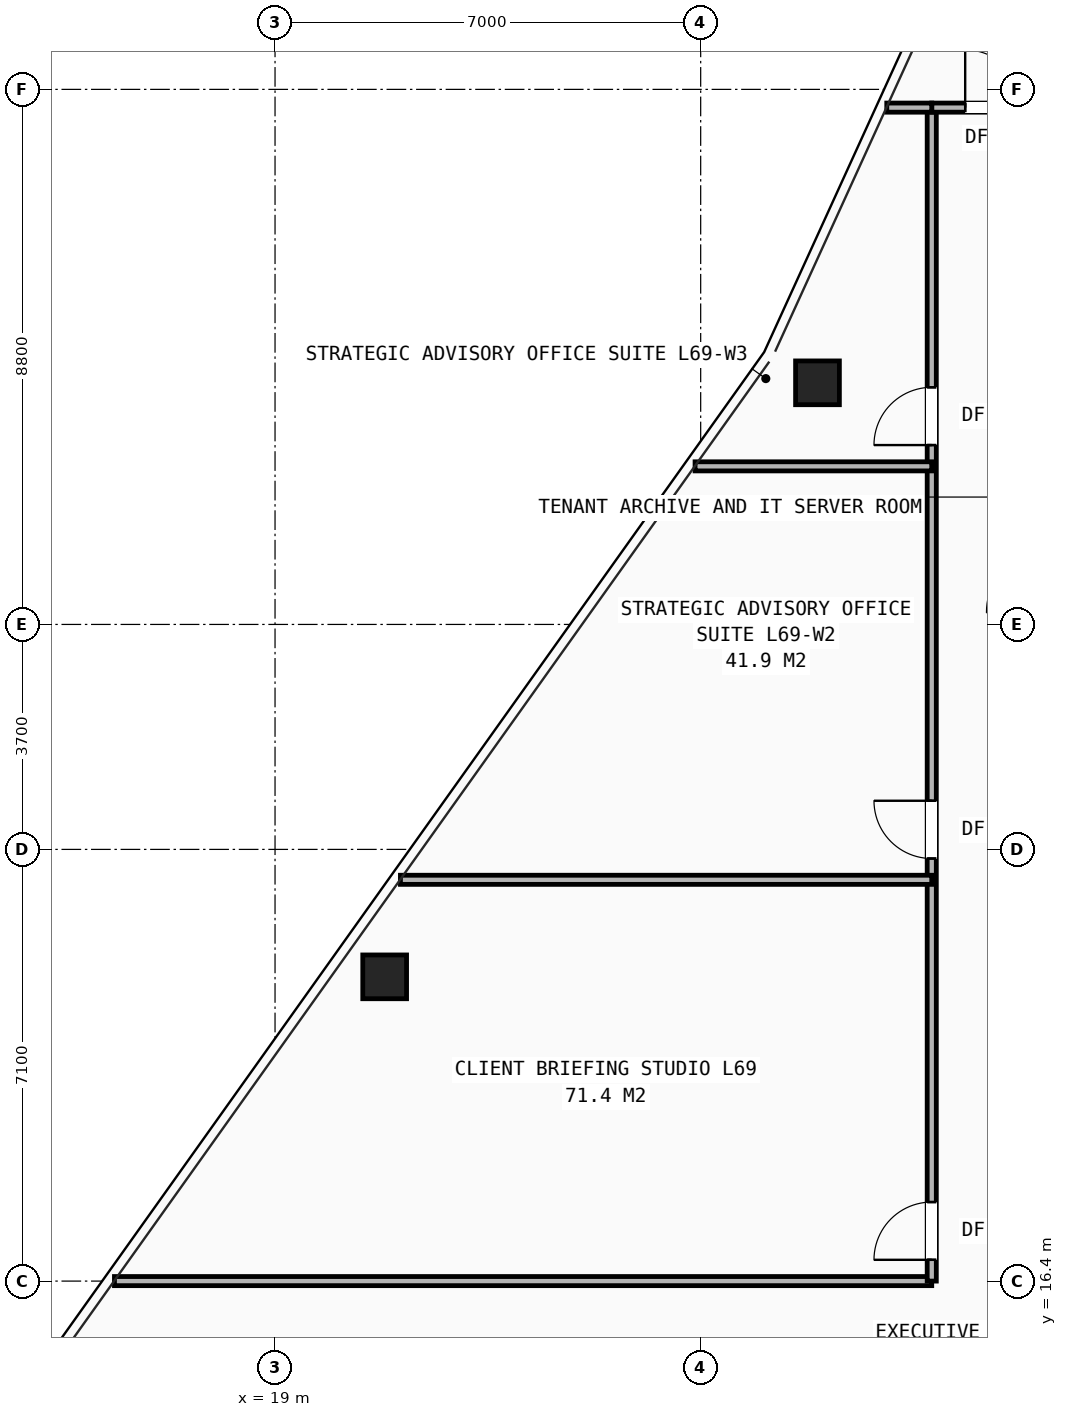
"""IFC4 building model, lengths in metres.
Left out: names, types, materials, properties, quantities, classifications, styles, units other than length and angle.
Written with IfcOpenShell. Run it as: python <this file> out.ifc"""

import sys

from ifc_helpers import new_model, si_unit, direction, frame, frame_2d, origin, origin_2d, place, context, subcontext, project, spatial, rectangle, hollow_rectangle, extrude, element, fill, save


model = new_model("IFC4")
c1 = context("Model", 3, precision=1e-05, world=origin(), true_north=direction((0.0, 1.0)))
c2 = subcontext(c1, "Body", "Model", "MODEL_VIEW")
j1 = project(units=[si_unit("LENGTHUNIT", "METRE"), si_unit("PLANEANGLEUNIT", "RADIAN")], contexts=[c1])
p1 = place(None, origin())
s1 = spatial("IfcSite", under=j1, at=p1, CompositionType="ELEMENT")
p2 = place(p1, origin())
s2 = spatial("IfcBuilding", under=s1, at=p2, CompositionType="ELEMENT")
p3 = place(p2, frame((0.0, 0.0, 243.4)))
s3 = spatial("IfcBuildingStorey", under=s2, at=p3, CompositionType="ELEMENT", Elevation=243.4)
for number, where, z_axis, x_axis in (
    (1, (27.921, 31.174, 0.0), (0.0, 0.0, 1.0), (1.0, 0.0, 0.0)),
    (2, (20.803, 21.404, 0.0), (0.0, 0.0, 1.0), (1.0, 0.0, 0.0)),
):
    element("IfcColumn", number, at=place(p3, frame(where, z_axis=z_axis, x_axis=x_axis)), inside=s3, PredefinedType="COLUMN", context=c2, shape_type="SweptSolid", body=[
        extrude(hollow_rectangle(XDim=0.72, YDim=0.72, WallThickness=0.05, at=origin_2d()), origin(), (0.0, 0.0, 1.0), 3.5),
    ])
p4 = place(p3, frame((16.359, 16.4, 0.0), z_axis=(0.0, 0.0, 1.0), x_axis=(1.0, 0.0, 0.0)))
e3 = element("IfcWall", 3, at=p4, inside=s3, PredefinedType="PARTITIONING", context=c2, shape_type="SweptSolid", body=[
    extrude(rectangle(XDim=13.441, YDim=0.15, at=frame_2d((6.72, 0.0))), origin(), (0.0, 0.0, 1.0), 2.292),
])
p5 = place(p3, frame((29.8, 16.4, 0.0), z_axis=(0.0, 0.0, 1.0), x_axis=(0.0, 1.0, 0.0)))
e4 = element("IfcWall", 4, at=p5, inside=s3, PredefinedType="PARTITIONING", context=c2, shape_type="SweptSolid", body=[
    extrude(rectangle(XDim=19.3, YDim=0.15, at=frame_2d((9.65, 0.0))), origin(), (0.0, 0.0, 1.0), 2.292),
])
p6 = place(p5, frame((0.35, 0.0, 0.0)))
e5 = element("IfcOpeningElement", 5, at=p6, cuts=e4, PredefinedType="OPENING", context=c2, shape_type="SweptSolid", body=[
    extrude(rectangle(XDim=0.95, YDim=2.1, at=frame_2d((0.475, 1.05))), frame((0.0, 0.085, 0.0), z_axis=(0.0, -1.0, 0.0), x_axis=(1.0, 0.0, 0.0)), (0.0, 0.0, 1.0), 0.17),
])
p7 = place(p5, frame((6.95, 0.0, 0.0)))
e6 = element("IfcOpeningElement", 6, at=p7, cuts=e4, PredefinedType="OPENING", context=c2, shape_type="SweptSolid", body=[
    extrude(rectangle(XDim=0.95, YDim=2.1, at=frame_2d((0.475, 1.05))), frame((0.0, 0.085, 0.0), z_axis=(0.0, -1.0, 0.0), x_axis=(1.0, 0.0, 0.0)), (0.0, 0.0, 1.0), 0.17),
])
p8 = place(p5, frame((13.75, 0.0, 0.0)))
e7 = element("IfcOpeningElement", 7, at=p8, cuts=e4, PredefinedType="OPENING", context=c2, shape_type="SweptSolid", body=[
    extrude(rectangle(XDim=0.95, YDim=2.1, at=frame_2d((0.475, 1.05))), frame((0.0, 0.085, 0.0), z_axis=(0.0, -1.0, 0.0), x_axis=(1.0, 0.0, 0.0)), (0.0, 0.0, 1.0), 0.17),
])
p9 = place(p3, frame((29.8, 35.7, 0.0), z_axis=(0.0, 0.0, 1.0), x_axis=(1.0, 0.0, 0.0)))
e8 = element("IfcWall", 8, at=p9, inside=s3, PredefinedType="PARTITIONING", context=c2, shape_type="SweptSolid", body=[
    extrude(rectangle(XDim=9.45, YDim=0.15, at=frame_2d((4.725, 0.0))), origin(), (0.0, 0.0, 1.0), 2.628),
])
p10 = place(p9, frame((0.55, 0.0, 0.0)))
e9 = element("IfcOpeningElement", 9, at=p10, cuts=e8, PredefinedType="OPENING", context=c2, shape_type="SweptSolid", body=[
    extrude(rectangle(XDim=0.95, YDim=2.1, at=frame_2d((0.475, 1.05))), frame((0.0, 0.085, 0.0), z_axis=(0.0, -1.0, 0.0), x_axis=(1.0, 0.0, 0.0)), (0.0, 0.0, 1.0), 0.17),
])
p11 = place(p9, frame((6.35, 0.0, 0.0)))
e10 = element("IfcOpeningElement", 10, at=p11, cuts=e8, PredefinedType="OPENING", context=c2, shape_type="SweptSolid", body=[
    extrude(rectangle(XDim=0.95, YDim=2.1, at=frame_2d((0.475, 1.05))), frame((0.0, 0.085, 0.0), z_axis=(0.0, -1.0, 0.0), x_axis=(1.0, 0.0, 0.0)), (0.0, 0.0, 1.0), 0.17),
])
p12 = place(p3, frame((29.06, 35.7, 0.0), z_axis=(0.0, 0.0, 1.0), x_axis=(1.0, 0.0, 0.0)))
e11 = element("IfcWall", 11, at=p12, inside=s3, PredefinedType="PARTITIONING", context=c2, shape_type="SweptSolid", body=[
    extrude(rectangle(XDim=0.74, YDim=0.15, at=frame_2d((0.37, 0.0))), origin(), (0.0, 0.0, 1.0), 2.628),
])
p13 = place(p3, frame((21.062, 23.0, 0.0), z_axis=(0.0, 0.0, 1.0), x_axis=(1.0, 0.0, 0.0)))
e12 = element("IfcWall", 12, at=p13, inside=s3, PredefinedType="PARTITIONING", context=c2, shape_type="SweptSolid", body=[
    extrude(rectangle(XDim=8.738, YDim=0.15, at=frame_2d((4.369, 0.0))), origin(), (0.0, 0.0, 1.0), 2.628),
])
p14 = place(p3, frame((25.908, 29.8, 0.0), z_axis=(0.0, 0.0, 1.0), x_axis=(1.0, 0.0, 0.0)))
e13 = element("IfcWall", 13, at=p14, inside=s3, PredefinedType="PARTITIONING", context=c2, shape_type="SweptSolid", body=[
    extrude(rectangle(XDim=3.892, YDim=0.15, at=frame_2d((1.946, 0.0))), origin(), (0.0, 0.0, 1.0), 2.628),
])
p15 = place(p6, origin())
e14 = element("IfcDoor", 14, at=p15, inside=s3, OperationType="SINGLE_SWING_LEFT", PredefinedType="DOOR", context=c2, shape_type="SweptSolid", body=[
    extrude(rectangle(XDim=0.95, YDim=2.1, at=frame_2d((0.475, 1.05))), frame((0.0, 0.025, 0.0), z_axis=(0.0, -1.0, 0.0), x_axis=(1.0, 0.0, 0.0)), (0.0, 0.0, 1.0), 0.05),
])
fill(e5, e14)
p16 = place(p7, origin())
e15 = element("IfcDoor", 15, at=p16, inside=s3, OperationType="SINGLE_SWING_RIGHT", PredefinedType="DOOR", context=c2, shape_type="SweptSolid", body=[
    extrude(rectangle(XDim=0.95, YDim=2.1, at=frame_2d((0.475, 1.05))), frame((0.0, 0.025, 0.0), z_axis=(0.0, -1.0, 0.0), x_axis=(1.0, 0.0, 0.0)), (0.0, 0.0, 1.0), 0.05),
])
fill(e6, e15)
p17 = place(p8, origin())
e16 = element("IfcDoor", 16, at=p17, inside=s3, OperationType="SINGLE_SWING_LEFT", PredefinedType="DOOR", context=c2, shape_type="SweptSolid", body=[
    extrude(rectangle(XDim=0.95, YDim=2.1, at=frame_2d((0.475, 1.05))), frame((0.0, 0.025, 0.0), z_axis=(0.0, -1.0, 0.0), x_axis=(1.0, 0.0, 0.0)), (0.0, 0.0, 1.0), 0.05),
])
fill(e7, e16)
p18 = place(p10, origin())
e17 = element("IfcDoor", 17, at=p18, inside=s3, OperationType="SINGLE_SWING_LEFT", PredefinedType="DOOR", context=c2, shape_type="SweptSolid", body=[
    extrude(rectangle(XDim=0.95, YDim=2.1, at=frame_2d((0.475, 1.05))), frame((0.0, 0.025, 0.0), z_axis=(0.0, -1.0, 0.0), x_axis=(1.0, 0.0, 0.0)), (0.0, 0.0, 1.0), 0.05),
])
fill(e9, e17)
save(model, sys.argv[1])
